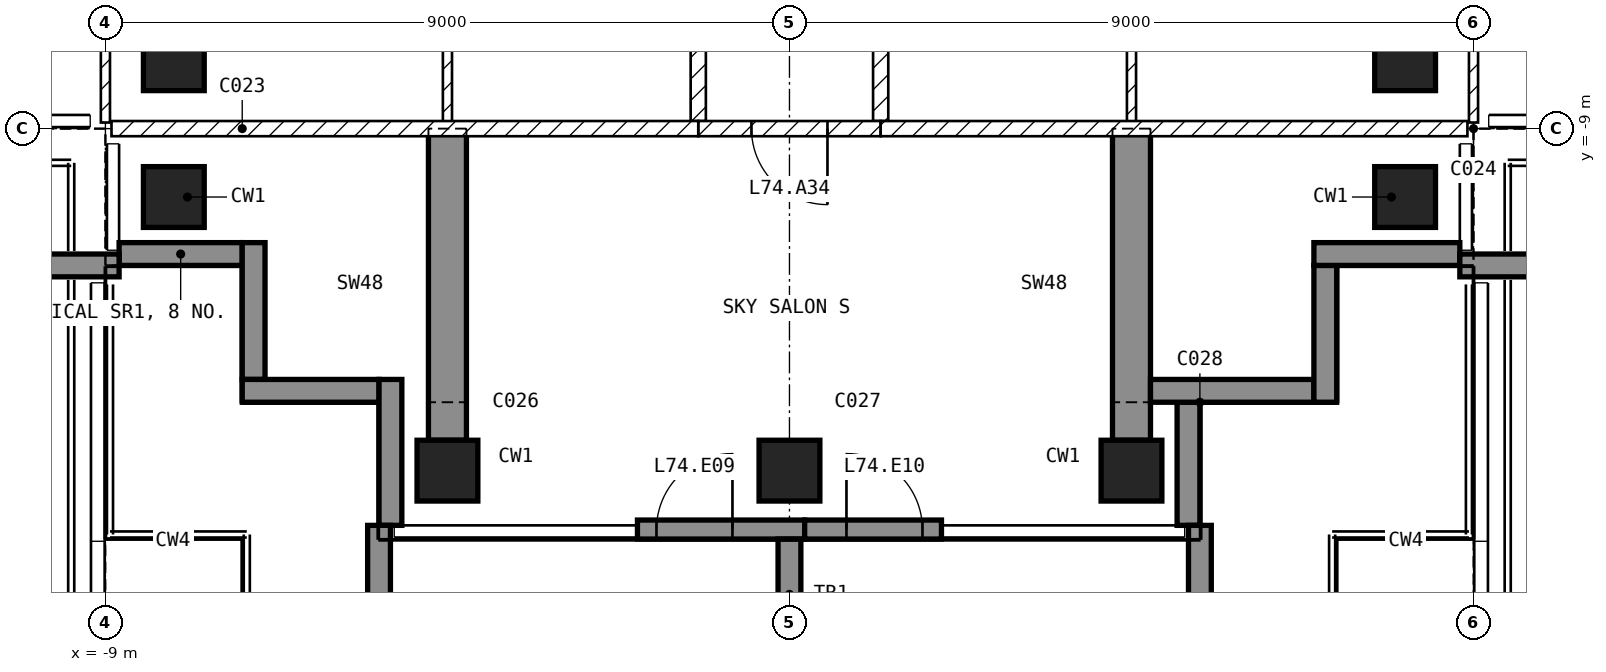
"""IFC4 building model, lengths in metres.
Left out: names, types, materials, properties, quantities, classifications, styles, units other than length and angle.
Written with IfcOpenShell. Run it as: python <this file> out.ifc"""

import sys

from ifc_helpers import new_model, si_unit, direction, frame, frame_2d, origin, origin_2d, place, context, subcontext, project, spatial, polyline, rectangle, outline, extrude, element, fill, save


model = new_model("IFC4")
c1 = context("Model", 3, precision=1e-05, world=origin(), true_north=direction((0.0, 1.0)))
c2 = subcontext(c1, "Body", "Model", "MODEL_VIEW")
j1 = project(units=[si_unit("LENGTHUNIT", "METRE"), si_unit("PLANEANGLEUNIT", "RADIAN")], contexts=[c1])
p1 = place(None, origin())
s1 = spatial("IfcSite", under=j1, at=p1, CompositionType="ELEMENT")
p2 = place(p1, origin())
s2 = spatial("IfcBuilding", under=s1, at=p2, CompositionType="ELEMENT")
p3 = place(p2, frame((0.0, 0.0, 290.4)))
s3 = spatial("IfcBuildingStorey", under=s2, at=p3, CompositionType="ELEMENT", Elevation=290.4)
for number, where, z_axis, x_axis in (
    (1, (-8.1, -9.9, -0.25), (0.0, 0.0, 1.0), (1.0, 0.0, 0.0)),
    (2, (-8.1, -8.1, -0.25), (0.0, 0.0, 1.0), (1.0, 0.0, 0.0)),
    (3, (-4.5, -13.5, -0.25), (0.0, 0.0, 1.0), (1.0, 0.0, 0.0)),
    (4, (0.0, -13.5, -0.25), (0.0, 0.0, 1.0), (1.0, 0.0, 0.0)),
    (5, (4.5, -13.5, -0.25), (0.0, 0.0, 1.0), (1.0, 0.0, 0.0)),
    (6, (8.1, -9.9, -0.25), (0.0, 0.0, 1.0), (1.0, 0.0, 0.0)),
    (7, (8.1, -8.1, -0.25), (0.0, 0.0, 1.0), (1.0, 0.0, 0.0)),
):
    element("IfcColumn", number, at=place(p3, frame(where, z_axis=z_axis, x_axis=x_axis)), inside=s3, PredefinedType="COLUMN", context=c2, shape_type="SweptSolid", body=[
        extrude(rectangle(XDim=0.8, YDim=0.8, at=origin_2d()), origin(), (0.0, 0.0, 1.0), 4.2),
    ])
for number, where, z_axis, x_axis in (
    (8, (-4.75, -13.1, -0.25), (1.0, 0.0, 0.0), (0.0, 1.0, 0.0)),
    (9, (4.25, -13.1, -0.25), (1.0, 0.0, 0.0), (0.0, 1.0, 0.0)),
):
    element("IfcWall", number, at=place(p3, frame(where, z_axis=z_axis, x_axis=x_axis)), inside=s3, PredefinedType="SHEAR", context=c2, shape_type="SweptSolid", body=[
        extrude(outline(polyline([(0.0, 0.0), (4.1, 0.0), (4.1, 4.2), (0.0, 4.2), (0.0, 0.0)])), origin(), (0.0, 0.0, 1.0), 0.5),
    ])
p4 = place(p3, frame((-2.0, -14.275, 0.0), z_axis=(0.0, 0.0, 1.0), x_axis=(1.0, 0.0, 0.0)))
e10 = element("IfcWall", 10, at=p4, inside=s3, PredefinedType="SOLIDWALL", context=c2, shape_type="SweptSolid", body=[
    extrude(rectangle(XDim=2.2, YDim=0.25, at=frame_2d((1.1, 0.0))), origin(), (0.0, 0.0, 1.0), 3.95),
])
p5 = place(p4, frame((0.25, 0.0, 0.0)))
e11 = element("IfcOpeningElement", 11, at=p5, cuts=e10, PredefinedType="OPENING", context=c2, shape_type="SweptSolid", body=[
    extrude(rectangle(XDim=1.0, YDim=2.4, at=frame_2d((0.5, 1.2))), frame((0.0, 0.135, 0.0), z_axis=(0.0, -1.0, 0.0), x_axis=(1.0, 0.0, 0.0)), (0.0, 0.0, 1.0), 0.27),
])
p6 = place(p3, frame((0.2, -14.275, 0.0), z_axis=(0.0, 0.0, 1.0), x_axis=(1.0, 0.0, 0.0)))
e12 = element("IfcWall", 12, at=p6, inside=s3, PredefinedType="SOLIDWALL", context=c2, shape_type="SweptSolid", body=[
    extrude(rectangle(XDim=1.8, YDim=0.25, at=frame_2d((0.9, 0.0))), origin(), (0.0, 0.0, 1.0), 3.95),
])
p7 = place(p6, frame((0.55, 0.0, 0.0)))
e13 = element("IfcOpeningElement", 13, at=p7, cuts=e12, PredefinedType="OPENING", context=c2, shape_type="SweptSolid", body=[
    extrude(rectangle(XDim=1.0, YDim=2.4, at=frame_2d((0.5, 1.2))), frame((0.0, 0.135, 0.0), z_axis=(0.0, -1.0, 0.0), x_axis=(1.0, 0.0, 0.0)), (0.0, 0.0, 1.0), 0.27),
])
p8 = place(p3, frame((5.25, -14.22, 0.0), z_axis=(0.0, 0.0, 1.0), x_axis=(0.0, 1.0, 0.0)))
e14 = element("IfcWall", 14, at=p8, inside=s3, PredefinedType="SOLIDWALL", context=c2, shape_type="SweptSolid", body=[
    extrude(rectangle(XDim=1.62, YDim=0.3, at=frame_2d((0.81, 0.0))), origin(), (0.0, 0.0, 1.0), 3.95),
])
p9 = place(p3, frame((4.75, -12.45, 0.0), z_axis=(0.0, 0.0, 1.0), x_axis=(1.0, 0.0, 0.0)))
e15 = element("IfcWall", 15, at=p9, inside=s3, PredefinedType="SOLIDWALL", context=c2, shape_type="SweptSolid", body=[
    extrude(rectangle(XDim=2.15, YDim=0.3, at=frame_2d((1.075, 0.0))), origin(), (0.0, 0.0, 1.0), 3.95),
])
p10 = place(p3, frame((7.05, -12.6, 0.0), z_axis=(0.0, 0.0, 1.0), x_axis=(0.0, 1.0, 0.0)))
e16 = element("IfcWall", 16, at=p10, inside=s3, PredefinedType="SOLIDWALL", context=c2, shape_type="SweptSolid", body=[
    extrude(rectangle(XDim=1.8, YDim=0.3, at=frame_2d((0.9, 0.0))), origin(), (0.0, 0.0, 1.0), 3.95),
])
p11 = place(p3, frame((6.9, -10.65, 0.0), z_axis=(0.0, 0.0, 1.0), x_axis=(1.0, 0.0, 0.0)))
e17 = element("IfcWall", 17, at=p11, inside=s3, PredefinedType="SOLIDWALL", context=c2, shape_type="SweptSolid", body=[
    extrude(rectangle(XDim=1.92, YDim=0.3, at=frame_2d((0.96, 0.0))), origin(), (0.0, 0.0, 1.0), 3.95),
])
p12 = place(p3, frame((-8.82, -10.65, 0.0), z_axis=(0.0, 0.0, 1.0), x_axis=(1.0, 0.0, 0.0)))
e18 = element("IfcWall", 18, at=p12, inside=s3, PredefinedType="SOLIDWALL", context=c2, shape_type="SweptSolid", body=[
    extrude(rectangle(XDim=1.62, YDim=0.3, at=frame_2d((0.81, 0.0))), origin(), (0.0, 0.0, 1.0), 3.95),
])
for number, where, z_axis, x_axis in (
    (19, (-7.05, -10.5, 0.0), (0.0, 0.0, 1.0), (0.0, -1.0, 0.0)),
    (20, (-7.2, -12.45, 0.0), (0.0, 0.0, 1.0), (1.0, 0.0, 0.0)),
):
    element("IfcWall", number, at=place(p3, frame(where, z_axis=z_axis, x_axis=x_axis)), inside=s3, PredefinedType="SOLIDWALL", context=c2, shape_type="SweptSolid", body=[
        extrude(rectangle(XDim=1.8, YDim=0.3, at=frame_2d((0.9, 0.0))), origin(), (0.0, 0.0, 1.0), 3.95),
    ])
p13 = place(p3, frame((-5.25, -12.3, 0.0), z_axis=(0.0, 0.0, 1.0), x_axis=(0.0, -1.0, 0.0)))
e21 = element("IfcWall", 21, at=p13, inside=s3, PredefinedType="SOLIDWALL", context=c2, shape_type="SweptSolid", body=[
    extrude(rectangle(XDim=1.92, YDim=0.3, at=frame_2d((0.96, 0.0))), origin(), (0.0, 0.0, 1.0), 3.95),
])
p14 = place(p3, frame((-8.82, -10.8, 0.0), z_axis=(0.0, 0.0, 1.0), x_axis=(-1.0, 0.0, 0.0)))
e22 = element("IfcWall", 22, at=p14, inside=s3, PredefinedType="SOLIDWALL", context=c2, shape_type="SweptSolid", body=[
    extrude(rectangle(XDim=2.88, YDim=0.3, at=frame_2d((1.44, 0.0))), origin(), (0.0, 0.0, 1.0), 3.95),
])
p15 = place(p3, frame((-5.4, -14.22, 0.0), z_axis=(0.0, 0.0, 1.0), x_axis=(0.0, -1.0, 0.0)))
e23 = element("IfcWall", 23, at=p15, inside=s3, PredefinedType="SOLIDWALL", context=c2, shape_type="SweptSolid", body=[
    extrude(rectangle(XDim=2.88, YDim=0.3, at=frame_2d((1.44, 0.0))), origin(), (0.0, 0.0, 1.0), 3.95),
])
p16 = place(p3, frame((0.0, -14.4, 0.0), z_axis=(0.0, 0.0, 1.0), x_axis=(0.0, -1.0, 0.0)))
e24 = element("IfcWall", 24, at=p16, inside=s3, PredefinedType="SOLIDWALL", context=c2, shape_type="SweptSolid", body=[
    extrude(rectangle(XDim=2.7, YDim=0.3, at=frame_2d((1.35, 0.0))), origin(), (0.0, 0.0, 1.0), 3.95),
])
p17 = place(p3, frame((5.4, -14.22, 0.0), z_axis=(0.0, 0.0, 1.0), x_axis=(0.0, -1.0, 0.0)))
e25 = element("IfcWall", 25, at=p17, inside=s3, PredefinedType="SOLIDWALL", context=c2, shape_type="SweptSolid", body=[
    extrude(rectangle(XDim=2.88, YDim=0.3, at=frame_2d((1.44, 0.0))), origin(), (0.0, 0.0, 1.0), 3.95),
])
p18 = place(p3, frame((8.82, -10.8, 0.0), z_axis=(0.0, 0.0, 1.0), x_axis=(1.0, 0.0, 0.0)))
e26 = element("IfcWall", 26, at=p18, inside=s3, PredefinedType="SOLIDWALL", context=c2, shape_type="SweptSolid", body=[
    extrude(rectangle(XDim=2.88, YDim=0.3, at=frame_2d((1.44, 0.0))), origin(), (0.0, 0.0, 1.0), 3.95),
])
for number, where, z_axis, x_axis in (
    (27, (1.2, -1.3, 0.0), (0.0, 0.0, 1.0), (0.0, -1.0, 0.0)),
    (28, (-1.2, -8.9, 0.0), (0.0, 0.0, 1.0), (0.0, 1.0, 0.0)),
):
    element("IfcWall", number, at=place(p3, frame(where, z_axis=z_axis, x_axis=x_axis)), inside=s3, PredefinedType="PARTITIONING", context=c2, shape_type="SweptSolid", body=[
        extrude(rectangle(XDim=7.6, YDim=0.2, at=frame_2d((3.8, 0.0))), origin(), (0.0, 0.0, 1.0), 3.95),
    ])
p19 = place(p3, frame((1.2, -9.0, 0.0), z_axis=(0.0, 0.0, 1.0), x_axis=(-1.0, 0.0, 0.0)))
e29 = element("IfcWall", 29, at=p19, inside=s3, PredefinedType="PARTITIONING", context=c2, shape_type="SweptSolid", body=[
    extrude(rectangle(XDim=2.4, YDim=0.2, at=frame_2d((1.2, 0.0))), origin(), (0.0, 0.0, 1.0), 3.95),
])
p20 = place(p19, frame((0.7, 0.0, 0.0)))
e30 = element("IfcOpeningElement", 30, at=p20, cuts=e29, PredefinedType="OPENING", context=c2, shape_type="SweptSolid", body=[
    extrude(rectangle(XDim=1.0, YDim=2.1, at=frame_2d((0.5, 1.05))), frame((0.0, 0.11, 0.0), z_axis=(0.0, -1.0, 0.0), x_axis=(1.0, 0.0, 0.0)), (0.0, 0.0, 1.0), 0.22),
])
p21 = place(p3, frame((9.0, -8.92, 0.0), z_axis=(0.0, 0.0, 1.0), x_axis=(0.0, 1.0, 0.0)))
e31 = element("IfcWall", 31, at=p21, inside=s3, PredefinedType="PARTITIONING", context=c2, shape_type="SweptSolid", body=[
    extrude(rectangle(XDim=7.62, YDim=0.12, at=frame_2d((3.81, 0.0))), origin(), (0.0, 0.0, 1.0), 3.95),
])
p22 = place(p21, frame((5.87, 0.0, 0.0)))
e32 = element("IfcOpeningElement", 32, at=p22, cuts=e31, PredefinedType="OPENING", context=c2, shape_type="SweptSolid", body=[
    extrude(rectangle(XDim=0.9, YDim=2.1, at=frame_2d((0.45, 1.05))), frame((0.0, 0.07, 0.0), z_axis=(0.0, -1.0, 0.0), x_axis=(1.0, 0.0, 0.0)), (0.0, 0.0, 1.0), 0.14),
])
p23 = place(p3, frame((4.5, -9.0, 0.0), z_axis=(0.0, 0.0, 1.0), x_axis=(0.0, 1.0, 0.0)))
e33 = element("IfcWall", 33, at=p23, inside=s3, PredefinedType="PARTITIONING", context=c2, shape_type="SweptSolid", body=[
    extrude(rectangle(XDim=3.9, YDim=0.12, at=frame_2d((1.95, 0.0))), origin(), (0.0, 0.0, 1.0), 3.95),
])
p24 = place(p23, frame((1.5, 0.0, 0.0)))
e34 = element("IfcOpeningElement", 34, at=p24, cuts=e33, PredefinedType="OPENING", context=c2, shape_type="SweptSolid", body=[
    extrude(rectangle(XDim=0.9, YDim=2.1, at=frame_2d((0.45, 1.05))), frame((0.0, 0.07, 0.0), z_axis=(0.0, -1.0, 0.0), x_axis=(1.0, 0.0, 0.0)), (0.0, 0.0, 1.0), 0.14),
])
p25 = place(p3, frame((8.92, -9.0, 0.0), z_axis=(0.0, 0.0, 1.0), x_axis=(-1.0, 0.0, 0.0)))
e35 = element("IfcWall", 35, at=p25, inside=s3, PredefinedType="PARTITIONING", context=c2, shape_type="SweptSolid", body=[
    extrude(rectangle(XDim=7.72, YDim=0.2, at=frame_2d((3.86, 0.0))), origin(), (0.0, 0.0, 1.0), 3.95),
])
p26 = place(p3, frame((-9.0, -1.3, 0.0), z_axis=(0.0, 0.0, 1.0), x_axis=(0.0, -1.0, 0.0)))
e36 = element("IfcWall", 36, at=p26, inside=s3, PredefinedType="PARTITIONING", context=c2, shape_type="SweptSolid", body=[
    extrude(rectangle(XDim=7.62, YDim=0.12, at=frame_2d((3.81, 0.0))), origin(), (0.0, 0.0, 1.0), 3.95),
])
p27 = place(p26, frame((4.4, 0.0, 0.0)))
e37 = element("IfcOpeningElement", 37, at=p27, cuts=e36, PredefinedType="OPENING", context=c2, shape_type="SweptSolid", body=[
    extrude(rectangle(XDim=0.9, YDim=2.1, at=frame_2d((0.45, 1.05))), frame((0.0, 0.07, 0.0), z_axis=(0.0, -1.0, 0.0), x_axis=(1.0, 0.0, 0.0)), (0.0, 0.0, 1.0), 0.14),
])
p28 = place(p3, frame((-4.5, -1.3, 0.0), z_axis=(0.0, 0.0, 1.0), x_axis=(0.0, -1.0, 0.0)))
e38 = element("IfcWall", 38, at=p28, inside=s3, PredefinedType="PARTITIONING", context=c2, shape_type="SweptSolid", body=[
    extrude(rectangle(XDim=7.7, YDim=0.12, at=frame_2d((3.85, 0.0))), origin(), (0.0, 0.0, 1.0), 3.95),
])
p29 = place(p28, frame((3.4, 0.0, 0.0)))
e39 = element("IfcOpeningElement", 39, at=p29, cuts=e38, PredefinedType="OPENING", context=c2, shape_type="SweptSolid", body=[
    extrude(rectangle(XDim=0.9, YDim=2.1, at=frame_2d((0.45, 1.05))), frame((0.0, 0.07, 0.0), z_axis=(0.0, -1.0, 0.0), x_axis=(1.0, 0.0, 0.0)), (0.0, 0.0, 1.0), 0.14),
])
p30 = place(p3, frame((-1.2, -9.0, 0.0), z_axis=(0.0, 0.0, 1.0), x_axis=(-1.0, 0.0, 0.0)))
e40 = element("IfcWall", 40, at=p30, inside=s3, PredefinedType="PARTITIONING", context=c2, shape_type="SweptSolid", body=[
    extrude(rectangle(XDim=7.72, YDim=0.2, at=frame_2d((3.86, 0.0))), origin(), (0.0, 0.0, 1.0), 3.95),
])
p31 = place(p5, origin())
e41 = element("IfcDoor", 41, at=p31, inside=s3, OperationType="SINGLE_SWING_RIGHT", PredefinedType="DOOR", context=c2, shape_type="SweptSolid", body=[
    extrude(rectangle(XDim=1.0, YDim=2.4, at=frame_2d((0.5, 1.2))), frame((0.0, 0.025, 0.0), z_axis=(0.0, -1.0, 0.0), x_axis=(1.0, 0.0, 0.0)), (0.0, 0.0, 1.0), 0.05),
])
fill(e11, e41)
p32 = place(p7, origin())
e42 = element("IfcDoor", 42, at=p32, inside=s3, OperationType="SINGLE_SWING_LEFT", PredefinedType="DOOR", context=c2, shape_type="SweptSolid", body=[
    extrude(rectangle(XDim=1.0, YDim=2.4, at=frame_2d((0.5, 1.2))), frame((0.0, 0.025, 0.0), z_axis=(0.0, -1.0, 0.0), x_axis=(1.0, 0.0, 0.0)), (0.0, 0.0, 1.0), 0.05),
])
fill(e13, e42)
p33 = place(p20, origin())
e43 = element("IfcDoor", 43, at=p33, inside=s3, OperationType="SINGLE_SWING_LEFT", PredefinedType="DOOR", context=c2, shape_type="SweptSolid", body=[
    extrude(rectangle(XDim=1.0, YDim=2.1, at=frame_2d((0.5, 1.05))), frame((0.0, 0.025, 0.0), z_axis=(0.0, -1.0, 0.0), x_axis=(1.0, 0.0, 0.0)), (0.0, 0.0, 1.0), 0.05),
])
fill(e30, e43)
save(model, sys.argv[1])
